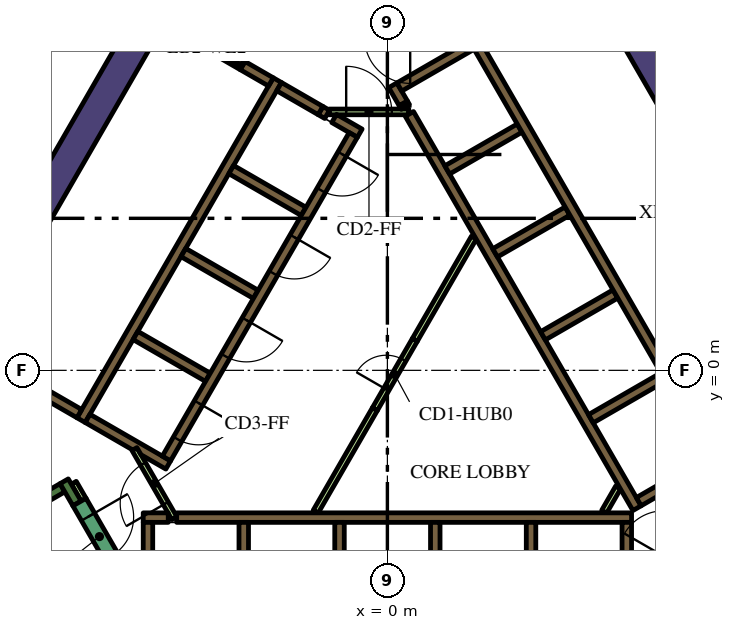
"""IFC4 building model, lengths in metres.
Left out: names, types, materials, properties, quantities, classifications, styles, units other than length and angle.
Written with IfcOpenShell. Run it as: python <this file> out.ifc"""

import sys

from ifc_helpers import new_model, si_unit, direction, frame, frame_2d, origin, place, context, subcontext, project, spatial, polyline, rectangle, outline, extrude, element, fill, save


model = new_model("IFC4")
c1 = context("Model", 3, precision=1e-05, world=origin(), true_north=direction((0.0, 1.0)))
c2 = subcontext(c1, "Body", "Model", "MODEL_VIEW")
j1 = project(units=[si_unit("LENGTHUNIT", "METRE"), si_unit("PLANEANGLEUNIT", "RADIAN")], contexts=[c1])
p1 = place(None, origin())
s1 = spatial("IfcSite", under=j1, at=p1, CompositionType="ELEMENT")
p2 = place(p1, origin())
s2 = spatial("IfcBuilding", under=s1, at=p2, CompositionType="ELEMENT")
p3 = place(p2, frame((0.0, 0.0, 154.2)))
s3 = spatial("IfcBuildingStorey", under=s2, at=p3, CompositionType="ELEMENT", Elevation=154.2)
p4 = place(p3, frame((8.279, 5.761, 0.0), z_axis=(0.0, 0.0, 1.0), x_axis=(-0.500010359015, 0.866019422922, 0.0)))
e1 = element("IfcWall", 1, at=p4, inside=s3, PredefinedType="SOLIDWALL", context=c2, shape_type="SweptSolid", body=[
    extrude(rectangle(XDim=12.528, YDim=0.8, at=frame_2d((6.264, 0.0))), origin(), (0.0, 0.0, 1.0), 4.2),
])
p5 = place(p3, frame((-12.668, -1.842, 0.0), z_axis=(0.0, 0.0, 1.0), x_axis=(0.500003640647, 0.866023301845, 0.0)))
e2 = element("IfcWall", 2, at=p5, inside=s3, PredefinedType="SOLIDWALL", context=c2, shape_type="SweptSolid", body=[
    extrude(rectangle(XDim=15.858, YDim=0.8, at=frame_2d((7.929, 0.0))), origin(), (0.0, 0.0, 1.0), 4.2),
])
p6 = place(p3, frame((-14.44, -6.49, 0.0), z_axis=(0.0, 0.0, 1.0), x_axis=(0.866022966069, 0.500004222222, 0.0)))
e3 = element("IfcWall", 3, at=p6, inside=s3, PredefinedType="SOLIDWALL", context=c2, shape_type="SweptSolid", body=[
    extrude(rectangle(XDim=6.8, YDim=0.25, at=frame_2d((3.4, 0.0))), origin(), (0.0, 0.0, 1.0), 4.2),
])
p7 = place(p3, frame((-8.168, -3.503, 0.0), z_axis=(0.0, 0.0, 1.0), x_axis=(-0.499952099219, 0.866053057547, 0.0)))
e4 = element("IfcWall", 4, at=p7, inside=s3, PredefinedType="SOLIDWALL", context=c2, shape_type="SweptSolid", body=[
    extrude(rectangle(XDim=0.675, YDim=0.25, at=frame_2d((0.337, 0.0))), origin(), (0.0, 0.0, 1.0), 4.2),
])
p8 = place(p3, frame((-5.545, -3.875, 0.0), z_axis=(0.0, 0.0, 1.0), x_axis=(1.0, 0.0, 0.0)))
e5 = element("IfcWall", 5, at=p8, inside=s3, PredefinedType="SOLIDWALL", context=c2, shape_type="SweptSolid", body=[
    extrude(rectangle(XDim=11.97, YDim=0.25, at=frame_2d((5.985, 0.0))), origin(), (0.0, 0.0, 1.0), 4.2),
])
p9 = place(p3, frame((-6.425, -3.875, 0.0), z_axis=(0.0, 0.0, 1.0), x_axis=(1.0, 0.0, 0.0)))
e6 = element("IfcWall", 6, at=p9, inside=s3, PredefinedType="SOLIDWALL", context=c2, shape_type="SweptSolid", body=[
    extrude(rectangle(XDim=0.658, YDim=0.25, at=frame_2d((0.329, 0.0))), origin(), (0.0, 0.0, 1.0), 4.2),
])
p10 = place(p3, frame((6.3, -7.24, 0.0), z_axis=(0.0, 0.0, 1.0), x_axis=(0.0, 1.0, 0.0)))
e7 = element("IfcWall", 7, at=p10, inside=s3, PredefinedType="SOLIDWALL", context=c2, shape_type="SweptSolid", body=[
    extrude(rectangle(XDim=3.24, YDim=0.25, at=frame_2d((1.62, 0.0))), origin(), (0.0, 0.0, 1.0), 4.2),
])
for number, where, z_axis, x_axis in (
    (8, (3.78, -4.0, 0.0), (0.0, 0.0, 1.0), (0.0, -1.0, 0.0)),
    (9, (1.26, -4.0, 0.0), (0.0, 0.0, 1.0), (0.0, -1.0, 0.0)),
    (10, (-1.26, -4.0, 0.0), (0.0, 0.0, 1.0), (0.0, -1.0, 0.0)),
    (11, (-3.78, -4.0, 0.0), (0.0, 0.0, 1.0), (0.0, -1.0, 0.0)),
):
    element("IfcWall", number, at=place(p3, frame(where, z_axis=z_axis, x_axis=x_axis)), inside=s3, PredefinedType="SOLIDWALL", context=c2, shape_type="SweptSolid", body=[
        extrude(rectangle(XDim=2.2, YDim=0.25, at=frame_2d((1.1, 0.0))), origin(), (0.0, 0.0, 1.0), 4.2),
    ])
p11 = place(p3, frame((-6.3, -7.125, 0.0), z_axis=(0.0, 0.0, 1.0), x_axis=(0.0, 1.0, 0.0)))
e12 = element("IfcWall", 12, at=p11, inside=s3, PredefinedType="SOLIDWALL", context=c2, shape_type="SweptSolid", body=[
    extrude(rectangle(XDim=3.125, YDim=0.25, at=frame_2d((1.562, 0.0))), origin(), (0.0, 0.0, 1.0), 4.2),
])
p12 = place(p3, frame((0.473, 6.93, 0.0), z_axis=(0.0, 0.0, 1.0), x_axis=(-0.49972245349, 0.866185586049, 0.0)))
e13 = element("IfcWall", 13, at=p12, inside=s3, PredefinedType="SOLIDWALL", context=c2, shape_type="SweptSolid", body=[
    extrude(rectangle(XDim=0.11, YDim=0.25, at=frame_2d((0.055, 0.0))), origin(), (0.0, 0.0, 1.0), 4.2),
])
p13 = place(p3, frame((6.568, -3.627, 0.0), z_axis=(0.0, 0.0, 1.0), x_axis=(-0.499999455981, 0.866025717874, 0.0)))
e14 = element("IfcWall", 14, at=p13, inside=s3, PredefinedType="SOLIDWALL", context=c2, shape_type="SweptSolid", body=[
    extrude(rectangle(XDim=11.978, YDim=0.25, at=frame_2d((5.989, 0.0))), origin(), (0.0, 0.0, 1.0), 4.2),
])
p14 = place(p3, frame((0.417, 7.027, 0.0), z_axis=(0.0, 0.0, 1.0), x_axis=(-0.500210807569, 0.865903659763, 0.0)))
e15 = element("IfcWall", 15, at=p14, inside=s3, PredefinedType="SOLIDWALL", context=c2, shape_type="SweptSolid", body=[
    extrude(rectangle(XDim=0.548, YDim=0.25, at=frame_2d((0.274, 0.0))), origin(), (0.0, 0.0, 1.0), 4.2),
])
p15 = place(p3, frame((3.1, 9.064, 0.0), z_axis=(0.0, 0.0, 1.0), x_axis=(-0.866030133475, -0.499991807846, 0.0)))
e16 = element("IfcWall", 16, at=p15, inside=s3, PredefinedType="SOLIDWALL", context=c2, shape_type="SweptSolid", body=[
    extrude(rectangle(XDim=3.217, YDim=0.25, at=frame_2d((1.608, 0.0))), origin(), (0.0, 0.0, 1.0), 4.2),
])
p16 = place(p3, frame((1.574, 5.274, 0.0), z_axis=(0.0, 0.0, 1.0), x_axis=(0.866028486751, 0.499994660107, 0.0)))
e17 = element("IfcWall", 17, at=p16, inside=s3, PredefinedType="SOLIDWALL", context=c2, shape_type="SweptSolid", body=[
    extrude(rectangle(XDim=2.2, YDim=0.25, at=frame_2d((1.1, 0.0))), origin(), (0.0, 0.0, 1.0), 4.2),
])
for number, where, z_axis, x_axis in (
    (18, (2.834, 3.091, 0.0), (0.0, 0.0, 1.0), (0.866, 0.5, 0.0)),
    (19, (4.094, 0.909, 0.0), (0.0, 0.0, 1.0), (0.866, 0.5, 0.0)),
    (20, (5.354, -1.274, 0.0), (0.0, 0.0, 1.0), (0.866, 0.5, 0.0)),
):
    element("IfcWall", number, at=place(p3, frame(where, z_axis=z_axis, x_axis=x_axis)), inside=s3, PredefinedType="SOLIDWALL", context=c2, shape_type="SweptSolid", body=[
        extrude(rectangle(XDim=2.2, YDim=0.25, at=frame_2d((1.1, 0.0))), origin(), (0.0, 0.0, 1.0), 4.2),
    ])
p17 = place(p3, frame((6.614, -3.456, 0.0), z_axis=(0.0, 0.0, 1.0), x_axis=(0.866032512851, 0.499987686533, 0.0)))
e21 = element("IfcWall", 21, at=p17, inside=s3, PredefinedType="SOLIDWALL", context=c2, shape_type="SweptSolid", body=[
    extrude(rectangle(XDim=2.975, YDim=0.25, at=frame_2d((1.487, 0.0))), origin(), (0.0, 0.0, 1.0), 4.2),
])
p18 = place(p3, frame((-8.06, -1.311, 0.0), z_axis=(0.0, 0.0, 1.0), x_axis=(0.50000273126, 0.866023826885, 0.0)))
e22 = element("IfcWall", 22, at=p18, inside=s3, PredefinedType="SOLIDWALL", context=c2, shape_type="SweptSolid", body=[
    extrude(rectangle(XDim=10.33, YDim=0.25, at=frame_2d((5.165, 0.0))), origin(), (0.0, 0.0, 1.0), 4.2),
])
p19 = place(p3, frame((-1.758, 6.835, 0.0), z_axis=(0.0, 0.0, 1.0), x_axis=(0.865982457891, -0.500074377092, 0.0)))
e23 = element("IfcWall", 23, at=p19, inside=s3, PredefinedType="SOLIDWALL", context=c2, shape_type="SweptSolid", body=[
    extrude(rectangle(XDim=0.2, YDim=0.25, at=frame_2d((0.1, 0.0))), origin(), (0.0, 0.0, 1.0), 4.2),
])
p20 = place(p3, frame((-1.76, 6.836, 0.0), z_axis=(0.0, 0.0, 1.0), x_axis=(-0.865952863304, 0.500125622755, 0.0)))
e24 = element("IfcWall", 24, at=p20, inside=s3, PredefinedType="SOLIDWALL", context=c2, shape_type="SweptSolid", body=[
    extrude(rectangle(XDim=1.258, YDim=0.25, at=frame_2d((0.629, 0.0))), origin(), (0.0, 0.0, 1.0), 4.2),
])
p21 = place(p3, frame((-0.728, 6.24, 0.0), z_axis=(0.0, 0.0, 1.0), x_axis=(-0.865955664968, 0.500120771724, 0.0)))
e25 = element("IfcWall", 25, at=p21, inside=s3, PredefinedType="SOLIDWALL", context=c2, shape_type="SweptSolid", body=[
    extrude(rectangle(XDim=0.778, YDim=0.25, at=frame_2d((0.389, 0.0))), origin(), (0.0, 0.0, 1.0), 4.2),
])
for number, where, z_axis, x_axis in (
    (26, (-2.204, 4.182, 0.0), (0.0, 0.0, 1.0), (-0.866, 0.5, 0.0)),
    (27, (-5.369, 3.1, 0.0), (0.0, 0.0, 1.0), (0.866, -0.5, 0.0)),
    (28, (-4.724, -0.182, 0.0), (0.0, 0.0, 1.0), (-0.866, 0.5, 0.0)),
):
    element("IfcWall", number, at=place(p3, frame(where, z_axis=z_axis, x_axis=x_axis)), inside=s3, PredefinedType="SOLIDWALL", context=c2, shape_type="SweptSolid", body=[
        extrude(rectangle(XDim=2.2, YDim=0.25, at=frame_2d((1.1, 0.0))), origin(), (0.0, 0.0, 1.0), 4.2),
    ])
p22 = place(p3, origin())
e29 = element("IfcWall", 29, at=p22, inside=s3, PredefinedType="SOLIDWALL", context=c2, shape_type="SweptSolid", body=[
    extrude(outline(polyline([(-5.922, -2.257), (-5.922, -2.257), (-5.705, -2.382), (-5.83, -2.598), (-6.483, -2.221), (-6.591, -2.033), (-6.591, -2.033), (-6.7, -2.096), (-7.952, -1.373), (-7.827, -1.156), (-5.922, -2.257)])), origin(), (0.0, 0.0, 1.0), 4.2),
])
p23 = place(p3, frame((-8.106, -1.14, 0.0), z_axis=(0.0, 0.0, 1.0), x_axis=(-0.866008981251, 0.500028443584, 0.0)))
e30 = element("IfcWall", 30, at=p23, inside=s3, PredefinedType="SOLIDWALL", context=c2, shape_type="SweptSolid", body=[
    extrude(rectangle(XDim=3.2, YDim=0.25, at=frame_2d((1.6, 0.0))), origin(), (0.0, 0.0, 1.0), 4.2),
])
p24 = place(p3, frame((-3.066, 7.59, 0.0), z_axis=(0.0, 0.0, 1.0), x_axis=(-0.866081358704, 0.49990307071, 0.0)))
e31 = element("IfcWall", 31, at=p24, inside=s3, PredefinedType="SOLIDWALL", context=c2, shape_type="SweptSolid", body=[
    extrude(rectangle(XDim=0.858, YDim=0.25, at=frame_2d((0.429, 0.0))), origin(), (0.0, 0.0, 1.0), 4.2),
])
e32 = element("IfcWall", 32, at=p22, inside=s3, PredefinedType="SOLIDWALL", context=c2, shape_type="SweptSolid", body=[
    extrude(outline(polyline([(-3.748, 8.128), (-3.813, 8.015), (-4.027, 8.139), (-4.017, 8.156), (-4.008, 8.173), (-4.0, 8.192), (-3.995, 8.21), (-3.991, 8.23), (-3.99, 8.25), (-3.99, 8.268), (-3.748, 8.128)])), origin(), (0.0, 0.0, 1.0), 4.2),
])
p25 = place(p3, frame((-8.252, -2.958, 0.0), z_axis=(0.0, 0.0, 1.0), x_axis=(0.500174715838, -0.865924508047, 0.0)))
e33 = element("IfcWall", 33, at=p25, inside=s3, PredefinedType="PARTITIONING", context=c2, shape_type="SweptSolid", body=[
    extrude(rectangle(XDim=0.514, YDim=0.15, at=frame_2d((0.257, 0.0))), origin(), (0.0, 0.0, 1.0), 3.15),
])
p26 = place(p3, frame((5.705, -3.718, 0.0), z_axis=(0.0, 0.0, 1.0), x_axis=(0.499962090823, 0.866047289552, 0.0)))
e34 = element("IfcWall", 34, at=p26, inside=s3, PredefinedType="PARTITIONING", context=c2, shape_type="SweptSolid", body=[
    extrude(rectangle(XDim=0.735, YDim=0.15, at=frame_2d((0.367, 0.0))), origin(), (0.0, 0.0, 1.0), 3.15),
])
p27 = place(p3, frame((-1.887, -3.718, 0.0), z_axis=(0.0, 0.0, 1.0), x_axis=(0.500043732237, 0.866000153493, 0.0)))
e35 = element("IfcWall", 35, at=p27, inside=s3, PredefinedType="PARTITIONING", context=c2, shape_type="SweptSolid", body=[
    extrude(rectangle(XDim=3.114, YDim=0.15, at=frame_2d((1.557, 0.0))), origin(), (0.0, 0.0, 1.0), 3.15),
])
p28 = place(p3, frame((0.72, 0.797, 0.0), z_axis=(0.0, 0.0, 1.0), x_axis=(0.499984921984, 0.866034108906, 0.0)))
e36 = element("IfcWall", 36, at=p28, inside=s3, PredefinedType="PARTITIONING", context=c2, shape_type="SweptSolid", body=[
    extrude(rectangle(XDim=3.113, YDim=0.15, at=frame_2d((1.557, 0.0))), origin(), (0.0, 0.0, 1.0), 3.15),
])
p29 = place(p3, frame((8.565, -2.185, 0.0), z_axis=(0.0, 0.0, 1.0), x_axis=(-0.499997954832, 0.866026584559, 0.0)))
e37 = element("IfcWall", 37, at=p29, inside=s3, PredefinedType="SOLIDWALL", context=c2, shape_type="SweptSolid", body=[
    extrude(rectangle(XDim=12.35, YDim=0.25, at=frame_2d((6.175, 0.0))), origin(), (0.0, 0.0, 1.0), 4.2),
])
p30 = place(p29, frame((0.585, 0.0, 0.0)))
e38 = element("IfcOpeningElement", 38, at=p30, cuts=e37, PredefinedType="OPENING", context=c2, shape_type="SweptSolid", body=[
    extrude(rectangle(XDim=1.1, YDim=2.1, at=frame_2d((0.55, 1.05))), frame((0.0, 0.135, 0.0), z_axis=(0.0, -1.0, 0.0), x_axis=(1.0, 0.0, 0.0)), (0.0, 0.0, 1.0), 0.27),
])
p31 = place(p3, frame((-0.898, 6.194, 0.0), z_axis=(0.0, 0.0, 1.0), x_axis=(-0.499996202215, -0.866027596426, 0.0)))
e39 = element("IfcWall", 39, at=p31, inside=s3, PredefinedType="SOLIDWALL", context=c2, shape_type="SweptSolid", body=[
    extrude(rectangle(XDim=9.83, YDim=0.25, at=frame_2d((4.915, 0.0))), origin(), (0.0, 0.0, 1.0), 4.2),
])
p32 = place(p31, frame((0.585, 0.0, 0.0)))
e40 = element("IfcOpeningElement", 40, at=p32, cuts=e39, PredefinedType="OPENING", context=c2, shape_type="SweptSolid", body=[
    extrude(rectangle(XDim=1.1, YDim=2.1, at=frame_2d((0.55, 1.05))), frame((0.0, 0.135, 0.0), z_axis=(0.0, -1.0, 0.0), x_axis=(1.0, 0.0, 0.0)), (0.0, 0.0, 1.0), 0.27),
])
p33 = place(p31, frame((3.105, 0.0, 0.0)))
e41 = element("IfcOpeningElement", 41, at=p33, cuts=e39, PredefinedType="OPENING", context=c2, shape_type="SweptSolid", body=[
    extrude(rectangle(XDim=1.1, YDim=2.1, at=frame_2d((0.55, 1.05))), frame((0.0, 0.135, 0.0), z_axis=(0.0, -1.0, 0.0), x_axis=(1.0, 0.0, 0.0)), (0.0, 0.0, 1.0), 0.27),
])
p34 = place(p31, frame((5.625, 0.0, 0.0)))
e42 = element("IfcOpeningElement", 42, at=p34, cuts=e39, PredefinedType="OPENING", context=c2, shape_type="SweptSolid", body=[
    extrude(rectangle(XDim=1.1, YDim=2.1, at=frame_2d((0.55, 1.05))), frame((0.0, 0.135, 0.0), z_axis=(0.0, -1.0, 0.0), x_axis=(1.0, 0.0, 0.0)), (0.0, 0.0, 1.0), 0.27),
])
p35 = place(p31, frame((8.145, 0.0, 0.0)))
e43 = element("IfcOpeningElement", 43, at=p35, cuts=e39, PredefinedType="OPENING", context=c2, shape_type="SweptSolid", body=[
    extrude(rectangle(XDim=1.1, YDim=2.1, at=frame_2d((0.55, 1.05))), frame((0.0, 0.135, 0.0), z_axis=(0.0, -1.0, 0.0), x_axis=(1.0, 0.0, 0.0)), (0.0, 0.0, 1.0), 0.27),
])
p36 = place(p3, frame((7.053, -5.284, 0.0), z_axis=(0.0, 0.0, 1.0), x_axis=(0.500078061341, 0.865980330357, 0.0)))
e44 = element("IfcWall", 44, at=p36, inside=s3, PredefinedType="SOLIDWALL", context=c2, shape_type="SweptSolid", body=[
    extrude(rectangle(XDim=2.1, YDim=0.4, at=frame_2d((1.05, 0.0))), origin(), (0.0, 0.0, 1.0), 4.2),
])
p37 = place(p36, frame((0.45, 0.0, 0.0)))
e45 = element("IfcOpeningElement", 45, at=p37, cuts=e44, PredefinedType="OPENING", context=c2, shape_type="SweptSolid", body=[
    extrude(rectangle(XDim=1.2, YDim=2.1, at=frame_2d((0.6, 1.05))), frame((0.0, 0.21, 0.0), z_axis=(0.0, -1.0, 0.0), x_axis=(1.0, 0.0, 0.0)), (0.0, 0.0, 1.0), 0.42),
])
p38 = place(p3, frame((-8.103, -3.466, 0.0), z_axis=(0.0, 0.0, 1.0), x_axis=(0.500078061341, -0.865980330357, 0.0)))
e46 = element("IfcWall", 46, at=p38, inside=s3, PredefinedType="SOLIDWALL", context=c2, shape_type="SweptSolid", body=[
    extrude(rectangle(XDim=2.1, YDim=0.4, at=frame_2d((1.05, 0.0))), origin(), (0.0, 0.0, 1.0), 4.2),
])
p39 = place(p38, frame((0.45, 0.0, 0.0)))
e47 = element("IfcOpeningElement", 47, at=p39, cuts=e46, PredefinedType="OPENING", context=c2, shape_type="SweptSolid", body=[
    extrude(rectangle(XDim=1.2, YDim=2.1, at=frame_2d((0.6, 1.05))), frame((0.0, 0.21, 0.0), z_axis=(0.0, -1.0, 0.0), x_axis=(1.0, 0.0, 0.0)), (0.0, 0.0, 1.0), 0.42),
])
p40 = place(p3, frame((-0.33, -1.022, 0.0), z_axis=(0.0, 0.0, 1.0), x_axis=(0.500027713859, 0.866009402589, 0.0)))
e48 = element("IfcWall", 48, at=p40, inside=s3, PredefinedType="PARTITIONING", context=c2, shape_type="SweptSolid", body=[
    extrude(rectangle(XDim=2.1, YDim=0.15, at=frame_2d((1.05, 0.0))), origin(), (0.0, 0.0, 1.0), 3.15),
])
p41 = place(p40, frame((0.6, 0.0, 0.0)))
e49 = element("IfcOpeningElement", 49, at=p41, cuts=e48, PredefinedType="OPENING", context=c2, shape_type="SweptSolid", body=[
    extrude(rectangle(XDim=0.9, YDim=2.1, at=frame_2d((0.45, 1.05))), frame((0.0, 0.085, 0.0), z_axis=(0.0, -1.0, 0.0), x_axis=(1.0, 0.0, 0.0)), (0.0, 0.0, 1.0), 0.17),
])
p42 = place(p3, frame((-1.534, 6.8, 0.0), z_axis=(0.0, 0.0, 1.0), x_axis=(1.0, 0.0, 0.0)))
e50 = element("IfcWall", 50, at=p42, inside=s3, PredefinedType="PARTITIONING", context=c2, shape_type="SweptSolid", body=[
    extrude(rectangle(XDim=2.1, YDim=0.15, at=frame_2d((1.05, 0.0))), origin(), (0.0, 0.0, 1.0), 3.15),
])
p43 = place(p42, frame((0.45, 0.0, 0.0)))
e51 = element("IfcOpeningElement", 51, at=p43, cuts=e50, PredefinedType="OPENING", context=c2, shape_type="SweptSolid", body=[
    extrude(rectangle(XDim=1.2, YDim=2.1, at=frame_2d((0.6, 1.05))), frame((0.0, 0.085, 0.0), z_axis=(0.0, -1.0, 0.0), x_axis=(1.0, 0.0, 0.0)), (0.0, 0.0, 1.0), 0.17),
])
p44 = place(p3, frame((-5.606, -3.89, 0.0), z_axis=(0.0, 0.0, 1.0), x_axis=(-0.500027713859, 0.866009402589, 0.0)))
e52 = element("IfcWall", 52, at=p44, inside=s3, PredefinedType="PARTITIONING", context=c2, shape_type="SweptSolid", body=[
    extrude(rectangle(XDim=2.1, YDim=0.15, at=frame_2d((1.05, 0.0))), origin(), (0.0, 0.0, 1.0), 3.15),
])
p45 = place(p44, frame((0.45, 0.0, 0.0)))
e53 = element("IfcOpeningElement", 53, at=p45, cuts=e52, PredefinedType="OPENING", context=c2, shape_type="SweptSolid", body=[
    extrude(rectangle(XDim=1.2, YDim=2.1, at=frame_2d((0.6, 1.05))), frame((0.0, 0.085, 0.0), z_axis=(0.0, -1.0, 0.0), x_axis=(1.0, 0.0, 0.0)), (0.0, 0.0, 1.0), 0.17),
])
p46 = place(p3, frame((-5.659, 9.012, 0.0), z_axis=(0.0, 0.0, 1.0), x_axis=(0.866009402589, -0.500027713859, 0.0)))
e54 = element("IfcWall", 54, at=p46, inside=s3, PredefinedType="PARTITIONING", context=c2, shape_type="SweptSolid", body=[
    extrude(rectangle(XDim=2.1, YDim=0.12, at=frame_2d((1.05, 0.0))), origin(), (0.0, 0.0, 1.0), 3.15),
])
p47 = place(p46, frame((0.45, 0.0, 0.0)))
e55 = element("IfcOpeningElement", 55, at=p47, cuts=e54, PredefinedType="OPENING", context=c2, shape_type="SweptSolid", body=[
    extrude(rectangle(XDim=1.2, YDim=2.1, at=frame_2d((0.6, 1.05))), frame((0.0, 0.07, 0.0), z_axis=(0.0, -1.0, 0.0), x_axis=(1.0, 0.0, 0.0)), (0.0, 0.0, 1.0), 0.14),
])
p48 = place(p3, frame((-8.532, 10.122, 0.0), z_axis=(0.0, 0.0, 1.0), x_axis=(-0.499988222896, -0.866032203192, 0.0)))
e56 = element("IfcWall", 56, at=p48, inside=s3, PredefinedType="PARTITIONING", context=c2, shape_type="SweptSolid", body=[
    extrude(rectangle(XDim=4.4, YDim=0.2, at=frame_2d((2.2, 0.0))), origin(), (0.0, 0.0, 1.0), 3.15),
])
p49 = place(p32, origin())
e57 = element("IfcDoor", 57, at=p49, inside=s3, OperationType="DOUBLE_DOOR_SLIDING", PredefinedType="DOOR", context=c2, shape_type="SweptSolid", body=[
    extrude(rectangle(XDim=1.1, YDim=2.1, at=frame_2d((0.55, 1.05))), frame((0.0, 0.025, 0.0), z_axis=(0.0, -1.0, 0.0), x_axis=(1.0, 0.0, 0.0)), (0.0, 0.0, 1.0), 0.05),
])
fill(e40, e57)
p50 = place(p33, origin())
e58 = element("IfcDoor", 58, at=p50, inside=s3, OperationType="DOUBLE_DOOR_SLIDING", PredefinedType="DOOR", context=c2, shape_type="SweptSolid", body=[
    extrude(rectangle(XDim=1.1, YDim=2.1, at=frame_2d((0.55, 1.05))), frame((0.0, 0.025, 0.0), z_axis=(0.0, -1.0, 0.0), x_axis=(1.0, 0.0, 0.0)), (0.0, 0.0, 1.0), 0.05),
])
fill(e41, e58)
p51 = place(p34, origin())
e59 = element("IfcDoor", 59, at=p51, inside=s3, OperationType="DOUBLE_DOOR_SLIDING", PredefinedType="DOOR", context=c2, shape_type="SweptSolid", body=[
    extrude(rectangle(XDim=1.1, YDim=2.1, at=frame_2d((0.55, 1.05))), frame((0.0, 0.025, 0.0), z_axis=(0.0, -1.0, 0.0), x_axis=(1.0, 0.0, 0.0)), (0.0, 0.0, 1.0), 0.05),
])
fill(e42, e59)
p52 = place(p35, origin())
e60 = element("IfcDoor", 60, at=p52, inside=s3, OperationType="DOUBLE_DOOR_SLIDING", PredefinedType="DOOR", context=c2, shape_type="SweptSolid", body=[
    extrude(rectangle(XDim=1.1, YDim=2.1, at=frame_2d((0.55, 1.05))), frame((0.0, 0.025, 0.0), z_axis=(0.0, -1.0, 0.0), x_axis=(1.0, 0.0, 0.0)), (0.0, 0.0, 1.0), 0.05),
])
fill(e43, e60)
p53 = place(p39, origin())
e61 = element("IfcDoor", 61, at=p53, inside=s3, OperationType="SINGLE_SWING_LEFT", PredefinedType="DOOR", context=c2, shape_type="SweptSolid", body=[
    extrude(rectangle(XDim=1.2, YDim=2.1, at=frame_2d((0.6, 1.05))), frame((0.0, 0.025, 0.0), z_axis=(0.0, -1.0, 0.0), x_axis=(1.0, 0.0, 0.0)), (0.0, 0.0, 1.0), 0.05),
])
fill(e47, e61)
p54 = place(p41, origin())
e62 = element("IfcDoor", 62, at=p54, inside=s3, OperationType="SINGLE_SWING_LEFT", PredefinedType="DOOR", context=c2, shape_type="SweptSolid", body=[
    extrude(rectangle(XDim=0.9, YDim=2.1, at=frame_2d((0.45, 1.05))), frame((0.0, 0.025, 0.0), z_axis=(0.0, -1.0, 0.0), x_axis=(1.0, 0.0, 0.0)), (0.0, 0.0, 1.0), 0.05),
])
fill(e49, e62)
p55 = place(p43, origin())
e63 = element("IfcDoor", 63, at=p55, inside=s3, OperationType="SINGLE_SWING_LEFT", PredefinedType="DOOR", context=c2, shape_type="SweptSolid", body=[
    extrude(rectangle(XDim=1.2, YDim=2.1, at=frame_2d((0.6, 1.05))), frame((0.0, 0.025, 0.0), z_axis=(0.0, -1.0, 0.0), x_axis=(1.0, 0.0, 0.0)), (0.0, 0.0, 1.0), 0.05),
])
fill(e51, e63)
p56 = place(p45, origin())
e64 = element("IfcDoor", 64, at=p56, inside=s3, OperationType="SINGLE_SWING_LEFT", PredefinedType="DOOR", context=c2, shape_type="SweptSolid", body=[
    extrude(rectangle(XDim=1.2, YDim=2.1, at=frame_2d((0.6, 1.05))), frame((0.0, 0.025, 0.0), z_axis=(0.0, -1.0, 0.0), x_axis=(1.0, 0.0, 0.0)), (0.0, 0.0, 1.0), 0.05),
])
fill(e53, e64)
p57 = place(p47, origin())
e65 = element("IfcDoor", 65, at=p57, inside=s3, OperationType="SINGLE_SWING_LEFT", PredefinedType="DOOR", context=c2, shape_type="SweptSolid", body=[
    extrude(rectangle(XDim=1.2, YDim=2.1, at=frame_2d((0.6, 1.05))), frame((0.0, 0.025, 0.0), z_axis=(0.0, -1.0, 0.0), x_axis=(1.0, 0.0, 0.0)), (0.0, 0.0, 1.0), 0.05),
])
fill(e55, e65)
save(model, sys.argv[1])
